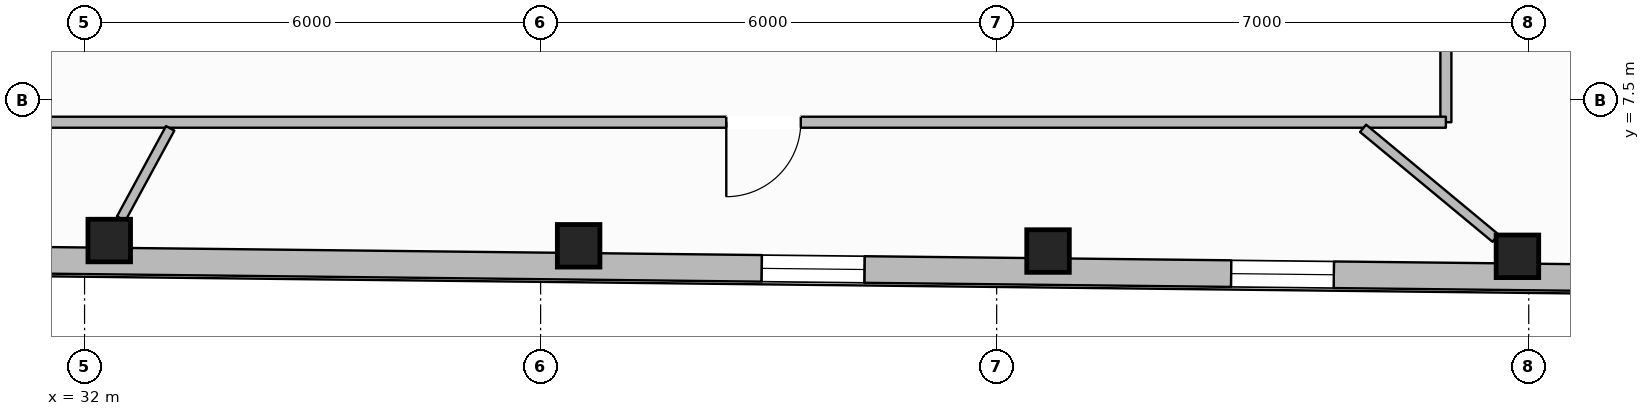
"""IFC4 building model, lengths in metres.
Left out: names, types, materials, properties, quantities, classifications, styles, units other than length and angle.
Written with IfcOpenShell. Run it as: python <this file> out.ifc"""

import sys

from ifc_helpers import new_model, si_unit, direction, frame, frame_2d, origin, origin_2d, place, context, subcontext, project, spatial, rectangle, hollow_rectangle, extrude, element, fill, save


model = new_model("IFC4")
c1 = context("Model", 3, precision=1e-05, world=origin(), true_north=direction((0.0, 1.0)))
c2 = subcontext(c1, "Body", "Model", "MODEL_VIEW")
j1 = project(units=[si_unit("LENGTHUNIT", "METRE"), si_unit("PLANEANGLEUNIT", "RADIAN")], contexts=[c1])
p1 = place(None, origin())
s1 = spatial("IfcSite", under=j1, at=p1, CompositionType="ELEMENT")
p2 = place(p1, origin())
s2 = spatial("IfcBuilding", under=s1, at=p2, CompositionType="ELEMENT")
p3 = place(p2, frame((0.0, 0.0, 251.05)))
s3 = spatial("IfcBuildingStorey", under=s2, at=p3, CompositionType="ELEMENT", Elevation=251.05)
for number, where, z_axis, x_axis in (
    (1, (32.325, 5.654, 0.0), (0.0, 0.0, 1.0), (1.0, 0.0, 0.0)),
    (2, (38.5, 5.584, 0.0), (0.0, 0.0, 1.0), (1.0, 0.0, 0.0)),
    (3, (44.676, 5.515, 0.0), (0.0, 0.0, 1.0), (1.0, 0.0, 0.0)),
    (4, (50.851, 5.446, 0.0), (0.0, 0.0, 1.0), (1.0, 0.0, 0.0)),
):
    element("IfcColumn", number, at=place(p3, frame(where, z_axis=z_axis, x_axis=x_axis)), inside=s3, PredefinedType="COLUMN", context=c2, shape_type="SweptSolid", body=[
        extrude(hollow_rectangle(XDim=0.56, YDim=0.56, WallThickness=0.025, at=origin_2d()), origin(), (0.0, 0.0, 1.0), 3.61),
    ])
p4 = place(p3, frame((57.506, 5.102, 0.0), z_axis=(0.0, 0.0, 1.0), x_axis=(-0.999937327785, 0.011195557226, 0.0)))
e5 = element("IfcWall", 5, at=p4, inside=s3, PredefinedType="STANDARD", context=c2, shape_type="SweptSolid", body=[
    extrude(rectangle(XDim=38.01, YDim=0.35, at=frame_2d((19.005, 0.0))), origin(), (0.0, 0.0, 1.0), 3.196),
])
p5 = place(p4, frame((33.775, 0.0, 0.65)))
e6 = element("IfcOpeningElement", 6, at=p5, cuts=e5, PredefinedType="OPENING", context=c2, shape_type="SweptSolid", body=[
    extrude(rectangle(XDim=1.35, YDim=1.75, at=frame_2d((0.675, 0.875))), frame((0.0, 0.185, 0.0), z_axis=(0.0, -1.0, 0.0), x_axis=(1.0, 0.0, 0.0)), (0.0, 0.0, 1.0), 0.37),
])
p6 = place(p4, frame((27.599, 0.0, 0.65)))
e7 = element("IfcOpeningElement", 7, at=p6, cuts=e5, PredefinedType="OPENING", context=c2, shape_type="SweptSolid", body=[
    extrude(rectangle(XDim=1.35, YDim=1.75, at=frame_2d((0.675, 0.875))), frame((0.0, 0.185, 0.0), z_axis=(0.0, -1.0, 0.0), x_axis=(1.0, 0.0, 0.0)), (0.0, 0.0, 1.0), 0.37),
])
p7 = place(p4, frame((15.247, 0.0, 0.65)))
e8 = element("IfcOpeningElement", 8, at=p7, cuts=e5, PredefinedType="OPENING", context=c2, shape_type="SweptSolid", body=[
    extrude(rectangle(XDim=1.35, YDim=1.75, at=frame_2d((0.675, 0.875))), frame((0.0, 0.185, 0.0), z_axis=(0.0, -1.0, 0.0), x_axis=(1.0, 0.0, 0.0)), (0.0, 0.0, 1.0), 0.37),
])
p8 = place(p4, frame((9.071, 0.0, 0.65)))
e9 = element("IfcOpeningElement", 9, at=p8, cuts=e5, PredefinedType="OPENING", context=c2, shape_type="SweptSolid", body=[
    extrude(rectangle(XDim=1.35, YDim=1.75, at=frame_2d((0.675, 0.875))), frame((0.0, 0.185, 0.0), z_axis=(0.0, -1.0, 0.0), x_axis=(1.0, 0.0, 0.0)), (0.0, 0.0, 1.0), 0.37),
])
p9 = place(p4, frame((2.896, 0.0, 0.65)))
e10 = element("IfcOpeningElement", 10, at=p9, cuts=e5, PredefinedType="OPENING", context=c2, shape_type="SweptSolid", body=[
    extrude(rectangle(XDim=1.35, YDim=1.75, at=frame_2d((0.675, 0.875))), frame((0.0, 0.185, 0.0), z_axis=(0.0, -1.0, 0.0), x_axis=(1.0, 0.0, 0.0)), (0.0, 0.0, 1.0), 0.37),
])
p10 = place(p3, frame((49.91, 12.15, 0.0), z_axis=(0.0, 0.0, 1.0), x_axis=(0.0, -1.0, 0.0)))
e11 = element("IfcWall", 11, at=p10, inside=s3, PredefinedType="PARTITIONING", context=c2, shape_type="SweptSolid", body=[
    extrude(rectangle(XDim=4.94, YDim=0.145, at=frame_2d((2.47, 0.0))), origin(), (0.0, 0.0, 1.0), 3.61),
])
p11 = place(p10, frame((1.77, 0.0, 0.0)))
e12 = element("IfcOpeningElement", 12, at=p11, cuts=e11, PredefinedType="OPENING", context=c2, shape_type="SweptSolid", body=[
    extrude(rectangle(XDim=1.4, YDim=2.2, at=frame_2d((0.7, 1.1))), frame((0.0, 0.083, 0.0), z_axis=(0.0, -1.0, 0.0), x_axis=(1.0, 0.0, 0.0)), (0.0, 0.0, 1.0), 0.165),
])
p12 = place(p3, frame((49.91, 7.21, 0.0), z_axis=(0.0, 0.0, 1.0), x_axis=(-1.0, 0.0, 0.0)))
e13 = element("IfcWall", 13, at=p12, inside=s3, PredefinedType="PARTITIONING", context=c2, shape_type="SweptSolid", body=[
    extrude(rectangle(XDim=23.82, YDim=0.145, at=frame_2d((11.91, 0.0))), origin(), (0.0, 0.0, 1.0), 3.61),
])
p13 = place(p12, frame((19.928, 0.0, 0.0)))
e14 = element("IfcOpeningElement", 14, at=p13, cuts=e13, PredefinedType="OPENING", context=c2, shape_type="SweptSolid", body=[
    extrude(rectangle(XDim=0.98, YDim=2.15, at=frame_2d((0.49, 1.075))), frame((0.0, 0.083, 0.0), z_axis=(0.0, -1.0, 0.0), x_axis=(1.0, 0.0, 0.0)), (0.0, 0.0, 1.0), 0.165),
])
p14 = place(p12, frame((8.487, 0.0, 0.0)))
e15 = element("IfcOpeningElement", 15, at=p14, cuts=e13, PredefinedType="OPENING", context=c2, shape_type="SweptSolid", body=[
    extrude(rectangle(XDim=0.98, YDim=2.15, at=frame_2d((0.49, 1.075))), frame((0.0, 0.083, 0.0), z_axis=(0.0, -1.0, 0.0), x_axis=(1.0, 0.0, 0.0)), (0.0, 0.0, 1.0), 0.165),
])
p15 = place(p3, frame((33.127, 7.129, 0.0), z_axis=(0.0, 0.0, 1.0), x_axis=(-0.47743452788, -0.878667327029, 0.0)))
e16 = element("IfcWall", 16, at=p15, inside=s3, PredefinedType="PARTITIONING", context=c2, shape_type="SweptSolid", body=[
    extrude(rectangle(XDim=1.352, YDim=0.125, at=frame_2d((0.676, 0.0))), origin(), (0.0, 0.0, 1.0), 3.61),
])
p16 = place(p3, frame((48.821, 7.129, 0.0), z_axis=(0.0, 0.0, 1.0), x_axis=(0.769836810093, -0.63824077418, 0.0)))
e17 = element("IfcWall", 17, at=p16, inside=s3, PredefinedType="PARTITIONING", context=c2, shape_type="SweptSolid", body=[
    extrude(rectangle(XDim=2.263, YDim=0.125, at=frame_2d((1.132, 0.0))), origin(), (0.0, 0.0, 1.0), 3.246),
])
p17 = place(p7, origin())
e18 = element("IfcWindow", 18, at=p17, inside=s3, PartitioningType="SINGLE_PANEL", PredefinedType="WINDOW", context=c2, shape_type="SweptSolid", body=[
    extrude(rectangle(XDim=1.35, YDim=1.75, at=frame_2d((0.675, 0.875))), frame((0.0, 0.03, 0.0), z_axis=(0.0, -1.0, 0.0), x_axis=(1.0, 0.0, 0.0)), (0.0, 0.0, 1.0), 0.06),
])
fill(e8, e18)
p18 = place(p8, origin())
e19 = element("IfcWindow", 19, at=p18, inside=s3, PartitioningType="SINGLE_PANEL", PredefinedType="WINDOW", context=c2, shape_type="SweptSolid", body=[
    extrude(rectangle(XDim=1.35, YDim=1.75, at=frame_2d((0.675, 0.875))), frame((0.0, 0.03, 0.0), z_axis=(0.0, -1.0, 0.0), x_axis=(1.0, 0.0, 0.0)), (0.0, 0.0, 1.0), 0.06),
])
fill(e9, e19)
p19 = place(p14, origin())
e20 = element("IfcDoor", 20, at=p19, inside=s3, OperationType="SINGLE_SWING_RIGHT", PredefinedType="DOOR", context=c2, shape_type="SweptSolid", body=[
    extrude(rectangle(XDim=0.98, YDim=2.15, at=frame_2d((0.49, 1.075))), frame((0.0, 0.025, 0.0), z_axis=(0.0, -1.0, 0.0), x_axis=(1.0, 0.0, 0.0)), (0.0, 0.0, 1.0), 0.05),
])
fill(e15, e20)
save(model, sys.argv[1])
